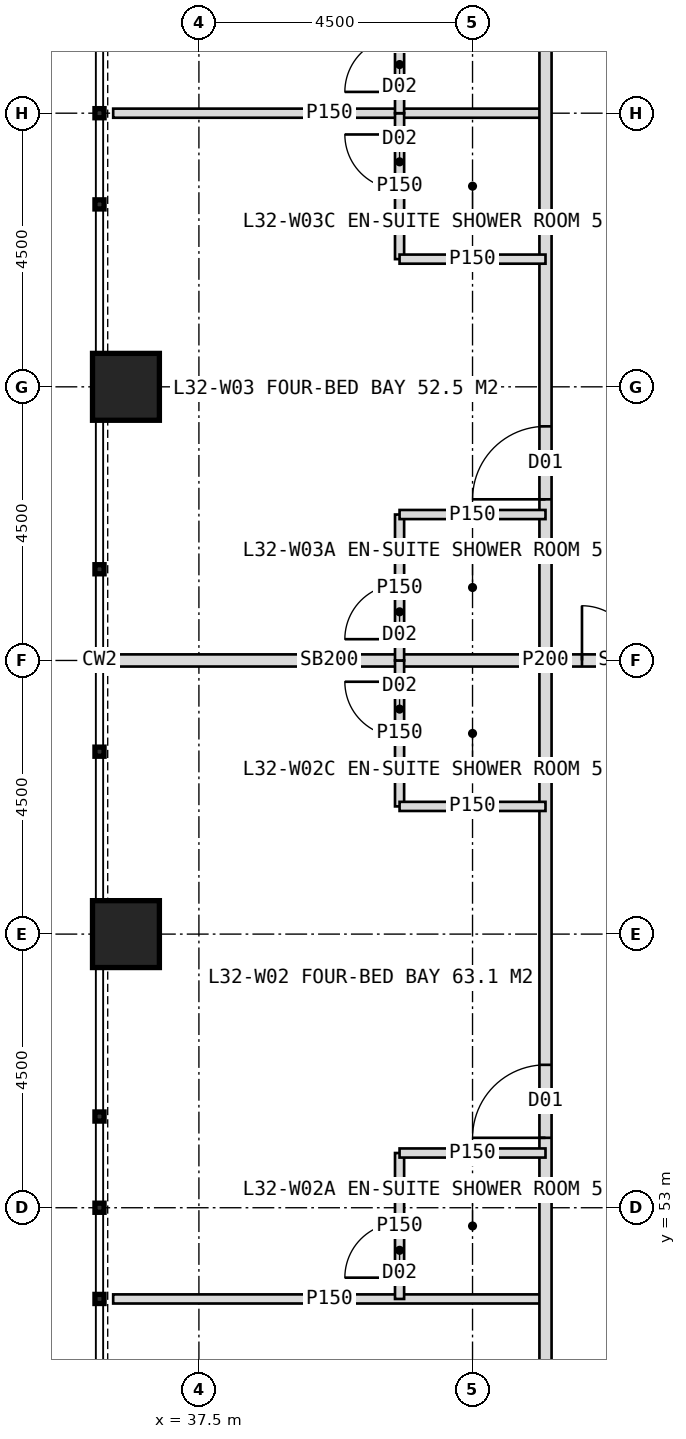
"""IFC4 building model, lengths in metres.
Left out: names, types, materials, properties, quantities, classifications, styles, units other than length and angle.
Written with IfcOpenShell. Run it as: python <this file> out.ifc"""

import sys

from ifc_helpers import new_model, si_unit, direction, frame, frame_2d, origin, origin_2d, place, context, subcontext, project, spatial, rectangle, hollow_rectangle, extrude, element, fill, save


model = new_model("IFC4")
c1 = context("Model", 3, precision=1e-05, world=origin(), true_north=direction((0.0, 1.0)))
c2 = subcontext(c1, "Body", "Model", "MODEL_VIEW")
j1 = project(units=[si_unit("LENGTHUNIT", "METRE"), si_unit("PLANEANGLEUNIT", "RADIAN")], contexts=[c1])
p1 = place(None, origin())
s1 = spatial("IfcSite", under=j1, at=p1, CompositionType="ELEMENT")
p2 = place(p1, origin())
s2 = spatial("IfcBuilding", under=s1, at=p2, CompositionType="ELEMENT")
p3 = place(p2, frame((0.0, 0.0, 136.0)))
s3 = spatial("IfcBuildingStorey", under=s2, at=p3, CompositionType="ELEMENT", Elevation=136.0)
for number, where, z_axis, x_axis in (
    (1, (36.3, 57.5, 0.0), (0.0, 0.0, 1.0), (1.0, 0.0, 0.0)),
    (2, (36.3, 66.5, 0.0), (0.0, 0.0, 1.0), (1.0, 0.0, 0.0)),
):
    element("IfcColumn", number, at=place(p3, frame(where, z_axis=z_axis, x_axis=x_axis)), inside=s3, PredefinedType="COLUMN", context=c2, shape_type="SweptSolid", body=[
        extrude(hollow_rectangle(XDim=1.1, YDim=1.1, WallThickness=0.1, at=origin_2d()), origin(), (0.0, 0.0, 1.0), 4.0),
    ])
p4 = place(p3, frame((43.2, 51.5, 0.0), z_axis=(0.0, 0.0, 1.0), x_axis=(-1.0, 0.0, 0.0)))
e3 = element("IfcWall", 3, at=p4, inside=s3, PredefinedType="PARTITIONING", context=c2, shape_type="SweptSolid", body=[
    extrude(rectangle(XDim=7.11, YDim=0.15, at=frame_2d((3.555, 0.0))), origin(), (0.0, 0.0, 1.0), 3.75),
])
p5 = place(p3, frame((43.2, 62.0, 0.0), z_axis=(0.0, 0.0, 1.0), x_axis=(-1.0, 0.0, 0.0)))
e4 = element("IfcWall", 4, at=p5, inside=s3, PredefinedType="SOLIDWALL", context=c2, shape_type="SweptSolid", body=[
    extrude(rectangle(XDim=7.11, YDim=0.2, at=frame_2d((3.555, 0.0))), origin(), (0.0, 0.0, 1.0), 2.95),
])
p6 = place(p3, frame((43.2, 71.0, 0.0), z_axis=(0.0, 0.0, 1.0), x_axis=(-1.0, 0.0, 0.0)))
e5 = element("IfcWall", 5, at=p6, inside=s3, PredefinedType="PARTITIONING", context=c2, shape_type="SweptSolid", body=[
    extrude(rectangle(XDim=7.11, YDim=0.15, at=frame_2d((3.555, 0.0))), origin(), (0.0, 0.0, 1.0), 3.75),
])
p7 = place(p3, frame((43.2, 45.2, 0.0), z_axis=(0.0, 0.0, 1.0), x_axis=(0.0, 1.0, 0.0)))
e6 = element("IfcWall", 6, at=p7, inside=s3, PredefinedType="PARTITIONING", context=c2, shape_type="SweptSolid", body=[
    extrude(rectangle(XDim=33.6, YDim=0.2, at=frame_2d((16.8, 0.0))), origin(), (0.0, 0.0, 1.0), 3.75),
])
p8 = place(p7, frame((2.65, 0.0, 0.0)))
e7 = element("IfcOpeningElement", 7, at=p8, cuts=e6, PredefinedType="OPENING", context=c2, shape_type="SweptSolid", body=[
    extrude(rectangle(XDim=1.2, YDim=2.2, at=frame_2d((0.6, 1.1))), frame((0.0, 0.11, 0.0), z_axis=(0.0, -1.0, 0.0), x_axis=(1.0, 0.0, 0.0)), (0.0, 0.0, 1.0), 0.22),
])
p9 = place(p7, frame((8.95, 0.0, 0.0)))
e8 = element("IfcOpeningElement", 8, at=p9, cuts=e6, PredefinedType="OPENING", context=c2, shape_type="SweptSolid", body=[
    extrude(rectangle(XDim=1.2, YDim=2.2, at=frame_2d((0.6, 1.1))), frame((0.0, 0.11, 0.0), z_axis=(0.0, -1.0, 0.0), x_axis=(1.0, 0.0, 0.0)), (0.0, 0.0, 1.0), 0.22),
])
p10 = place(p7, frame((19.45, 0.0, 0.0)))
e9 = element("IfcOpeningElement", 9, at=p10, cuts=e6, PredefinedType="OPENING", context=c2, shape_type="SweptSolid", body=[
    extrude(rectangle(XDim=1.2, YDim=2.2, at=frame_2d((0.6, 1.1))), frame((0.0, 0.11, 0.0), z_axis=(0.0, -1.0, 0.0), x_axis=(1.0, 0.0, 0.0)), (0.0, 0.0, 1.0), 0.22),
])
p11 = place(p7, frame((28.45, 0.0, 0.0)))
e10 = element("IfcOpeningElement", 10, at=p11, cuts=e6, PredefinedType="OPENING", context=c2, shape_type="SweptSolid", body=[
    extrude(rectangle(XDim=1.2, YDim=2.2, at=frame_2d((0.6, 1.1))), frame((0.0, 0.11, 0.0), z_axis=(0.0, -1.0, 0.0), x_axis=(1.0, 0.0, 0.0)), (0.0, 0.0, 1.0), 0.22),
])
p12 = place(p3, frame((40.8, 51.5, 0.0), z_axis=(0.0, 0.0, 1.0), x_axis=(0.0, 1.0, 0.0)))
e11 = element("IfcWall", 11, at=p12, inside=s3, PredefinedType="PARTITIONING", context=c2, shape_type="SweptSolid", body=[
    extrude(rectangle(XDim=2.4, YDim=0.15, at=frame_2d((1.2, 0.0))), origin(), (0.0, 0.0, 1.0), 3.75),
])
p13 = place(p12, frame((0.35, 0.0, 0.0)))
e12 = element("IfcOpeningElement", 12, at=p13, cuts=e11, PredefinedType="OPENING", context=c2, shape_type="SweptSolid", body=[
    extrude(rectangle(XDim=0.9, YDim=2.1, at=frame_2d((0.45, 1.05))), frame((0.0, 0.085, 0.0), z_axis=(0.0, -1.0, 0.0), x_axis=(1.0, 0.0, 0.0)), (0.0, 0.0, 1.0), 0.17),
])
p14 = place(p3, frame((43.2, 53.9, 0.0), z_axis=(0.0, 0.0, 1.0), x_axis=(-1.0, 0.0, 0.0)))
e13 = element("IfcWall", 13, at=p14, inside=s3, PredefinedType="PARTITIONING", context=c2, shape_type="SweptSolid", body=[
    extrude(rectangle(XDim=2.4, YDim=0.15, at=frame_2d((1.2, 0.0))), origin(), (0.0, 0.0, 1.0), 3.75),
])
p15 = place(p3, frame((40.8, 59.6, 0.0), z_axis=(0.0, 0.0, 1.0), x_axis=(0.0, 1.0, 0.0)))
e14 = element("IfcWall", 14, at=p15, inside=s3, PredefinedType="PARTITIONING", context=c2, shape_type="SweptSolid", body=[
    extrude(rectangle(XDim=2.4, YDim=0.15, at=frame_2d((1.2, 0.0))), origin(), (0.0, 0.0, 1.0), 3.75),
])
p16 = place(p15, frame((1.15, 0.0, 0.0)))
e15 = element("IfcOpeningElement", 15, at=p16, cuts=e14, PredefinedType="OPENING", context=c2, shape_type="SweptSolid", body=[
    extrude(rectangle(XDim=0.9, YDim=2.1, at=frame_2d((0.45, 1.05))), frame((0.0, 0.085, 0.0), z_axis=(0.0, -1.0, 0.0), x_axis=(1.0, 0.0, 0.0)), (0.0, 0.0, 1.0), 0.17),
])
p17 = place(p3, frame((43.2, 59.6, 0.0), z_axis=(0.0, 0.0, 1.0), x_axis=(-1.0, 0.0, 0.0)))
e16 = element("IfcWall", 16, at=p17, inside=s3, PredefinedType="PARTITIONING", context=c2, shape_type="SweptSolid", body=[
    extrude(rectangle(XDim=2.4, YDim=0.15, at=frame_2d((1.2, 0.0))), origin(), (0.0, 0.0, 1.0), 3.75),
])
p18 = place(p3, frame((40.8, 62.0, 0.0), z_axis=(0.0, 0.0, 1.0), x_axis=(0.0, 1.0, 0.0)))
e17 = element("IfcWall", 17, at=p18, inside=s3, PredefinedType="PARTITIONING", context=c2, shape_type="SweptSolid", body=[
    extrude(rectangle(XDim=2.4, YDim=0.15, at=frame_2d((1.2, 0.0))), origin(), (0.0, 0.0, 1.0), 3.75),
])
p19 = place(p18, frame((0.35, 0.0, 0.0)))
e18 = element("IfcOpeningElement", 18, at=p19, cuts=e17, PredefinedType="OPENING", context=c2, shape_type="SweptSolid", body=[
    extrude(rectangle(XDim=0.9, YDim=2.1, at=frame_2d((0.45, 1.05))), frame((0.0, 0.085, 0.0), z_axis=(0.0, -1.0, 0.0), x_axis=(1.0, 0.0, 0.0)), (0.0, 0.0, 1.0), 0.17),
])
p20 = place(p3, frame((43.2, 64.4, 0.0), z_axis=(0.0, 0.0, 1.0), x_axis=(-1.0, 0.0, 0.0)))
e19 = element("IfcWall", 19, at=p20, inside=s3, PredefinedType="PARTITIONING", context=c2, shape_type="SweptSolid", body=[
    extrude(rectangle(XDim=2.4, YDim=0.15, at=frame_2d((1.2, 0.0))), origin(), (0.0, 0.0, 1.0), 3.75),
])
p21 = place(p3, frame((40.8, 68.6, 0.0), z_axis=(0.0, 0.0, 1.0), x_axis=(0.0, 1.0, 0.0)))
e20 = element("IfcWall", 20, at=p21, inside=s3, PredefinedType="PARTITIONING", context=c2, shape_type="SweptSolid", body=[
    extrude(rectangle(XDim=2.4, YDim=0.15, at=frame_2d((1.2, 0.0))), origin(), (0.0, 0.0, 1.0), 3.75),
])
p22 = place(p21, frame((1.15, 0.0, 0.0)))
e21 = element("IfcOpeningElement", 21, at=p22, cuts=e20, PredefinedType="OPENING", context=c2, shape_type="SweptSolid", body=[
    extrude(rectangle(XDim=0.9, YDim=2.1, at=frame_2d((0.45, 1.05))), frame((0.0, 0.085, 0.0), z_axis=(0.0, -1.0, 0.0), x_axis=(1.0, 0.0, 0.0)), (0.0, 0.0, 1.0), 0.17),
])
p23 = place(p3, frame((43.2, 68.6, 0.0), z_axis=(0.0, 0.0, 1.0), x_axis=(-1.0, 0.0, 0.0)))
e22 = element("IfcWall", 22, at=p23, inside=s3, PredefinedType="PARTITIONING", context=c2, shape_type="SweptSolid", body=[
    extrude(rectangle(XDim=2.4, YDim=0.15, at=frame_2d((1.2, 0.0))), origin(), (0.0, 0.0, 1.0), 3.75),
])
p24 = place(p3, frame((40.8, 71.0, 0.0), z_axis=(0.0, 0.0, 1.0), x_axis=(0.0, 1.0, 0.0)))
e23 = element("IfcWall", 23, at=p24, inside=s3, PredefinedType="PARTITIONING", context=c2, shape_type="SweptSolid", body=[
    extrude(rectangle(XDim=2.4, YDim=0.15, at=frame_2d((1.2, 0.0))), origin(), (0.0, 0.0, 1.0), 3.75),
])
p25 = place(p24, frame((0.35, 0.0, 0.0)))
e24 = element("IfcOpeningElement", 24, at=p25, cuts=e23, PredefinedType="OPENING", context=c2, shape_type="SweptSolid", body=[
    extrude(rectangle(XDim=0.9, YDim=2.1, at=frame_2d((0.45, 1.05))), frame((0.0, 0.085, 0.0), z_axis=(0.0, -1.0, 0.0), x_axis=(1.0, 0.0, 0.0)), (0.0, 0.0, 1.0), 0.17),
])
p26 = place(p3, frame((45.9, 62.0, 0.0), z_axis=(0.0, 0.0, 1.0), x_axis=(-1.0, 0.0, 0.0)))
e25 = element("IfcWall", 25, at=p26, inside=s3, PredefinedType="SOLIDWALL", context=c2, shape_type="SweptSolid", body=[
    extrude(rectangle(XDim=2.7, YDim=0.2, at=frame_2d((1.35, 0.0))), origin(), (0.0, 0.0, 1.0), 2.95),
])
p27 = place(p26, frame((0.3, 0.0, 0.0)))
e26 = element("IfcOpeningElement", 26, at=p27, cuts=e25, PredefinedType="OPENING", context=c2, shape_type="SweptSolid", body=[
    extrude(rectangle(XDim=1.8, YDim=2.2, at=frame_2d((0.9, 1.1))), frame((0.0, 0.11, 0.0), z_axis=(0.0, -1.0, 0.0), x_axis=(1.0, 0.0, 0.0)), (0.0, 0.0, 1.0), 0.22),
])
p28 = place(p9, origin())
e27 = element("IfcDoor", 27, at=p28, inside=s3, OperationType="SINGLE_SWING_LEFT", PredefinedType="DOOR", context=c2, shape_type="SweptSolid", body=[
    extrude(rectangle(XDim=1.2, YDim=2.2, at=frame_2d((0.6, 1.1))), frame((0.0, 0.025, 0.0), z_axis=(0.0, -1.0, 0.0), x_axis=(1.0, 0.0, 0.0)), (0.0, 0.0, 1.0), 0.05),
])
fill(e8, e27)
p29 = place(p13, origin())
e28 = element("IfcDoor", 28, at=p29, inside=s3, OperationType="SINGLE_SWING_LEFT", PredefinedType="DOOR", context=c2, shape_type="SweptSolid", body=[
    extrude(rectangle(XDim=0.9, YDim=2.1, at=frame_2d((0.45, 1.05))), frame((0.0, 0.025, 0.0), z_axis=(0.0, -1.0, 0.0), x_axis=(1.0, 0.0, 0.0)), (0.0, 0.0, 1.0), 0.05),
])
fill(e12, e28)
p30 = place(p16, origin())
e29 = element("IfcDoor", 29, at=p30, inside=s3, OperationType="SINGLE_SWING_RIGHT", PredefinedType="DOOR", context=c2, shape_type="SweptSolid", body=[
    extrude(rectangle(XDim=0.9, YDim=2.1, at=frame_2d((0.45, 1.05))), frame((0.0, 0.025, 0.0), z_axis=(0.0, -1.0, 0.0), x_axis=(1.0, 0.0, 0.0)), (0.0, 0.0, 1.0), 0.05),
])
fill(e15, e29)
p31 = place(p10, origin())
e30 = element("IfcDoor", 30, at=p31, inside=s3, OperationType="SINGLE_SWING_LEFT", PredefinedType="DOOR", context=c2, shape_type="SweptSolid", body=[
    extrude(rectangle(XDim=1.2, YDim=2.2, at=frame_2d((0.6, 1.1))), frame((0.0, 0.025, 0.0), z_axis=(0.0, -1.0, 0.0), x_axis=(1.0, 0.0, 0.0)), (0.0, 0.0, 1.0), 0.05),
])
fill(e9, e30)
p32 = place(p19, origin())
e31 = element("IfcDoor", 31, at=p32, inside=s3, OperationType="SINGLE_SWING_LEFT", PredefinedType="DOOR", context=c2, shape_type="SweptSolid", body=[
    extrude(rectangle(XDim=0.9, YDim=2.1, at=frame_2d((0.45, 1.05))), frame((0.0, 0.025, 0.0), z_axis=(0.0, -1.0, 0.0), x_axis=(1.0, 0.0, 0.0)), (0.0, 0.0, 1.0), 0.05),
])
fill(e18, e31)
p33 = place(p22, origin())
e32 = element("IfcDoor", 32, at=p33, inside=s3, OperationType="SINGLE_SWING_RIGHT", PredefinedType="DOOR", context=c2, shape_type="SweptSolid", body=[
    extrude(rectangle(XDim=0.9, YDim=2.1, at=frame_2d((0.45, 1.05))), frame((0.0, 0.025, 0.0), z_axis=(0.0, -1.0, 0.0), x_axis=(1.0, 0.0, 0.0)), (0.0, 0.0, 1.0), 0.05),
])
fill(e21, e32)
p34 = place(p25, origin())
e33 = element("IfcDoor", 33, at=p34, inside=s3, OperationType="SINGLE_SWING_LEFT", PredefinedType="DOOR", context=c2, shape_type="SweptSolid", body=[
    extrude(rectangle(XDim=0.9, YDim=2.1, at=frame_2d((0.45, 1.05))), frame((0.0, 0.025, 0.0), z_axis=(0.0, -1.0, 0.0), x_axis=(1.0, 0.0, 0.0)), (0.0, 0.0, 1.0), 0.05),
])
fill(e24, e33)
p35 = place(p27, origin())
e34 = element("IfcDoor", 34, at=p35, inside=s3, OperationType="DOUBLE_DOOR_DOUBLE_SWING", PredefinedType="DOOR", context=c2, shape_type="SweptSolid", body=[
    extrude(rectangle(XDim=1.8, YDim=2.2, at=frame_2d((0.9, 1.1))), frame((0.0, 0.025, 0.0), z_axis=(0.0, -1.0, 0.0), x_axis=(1.0, 0.0, 0.0)), (0.0, 0.0, 1.0), 0.05),
])
fill(e26, e34)
save(model, sys.argv[1])
